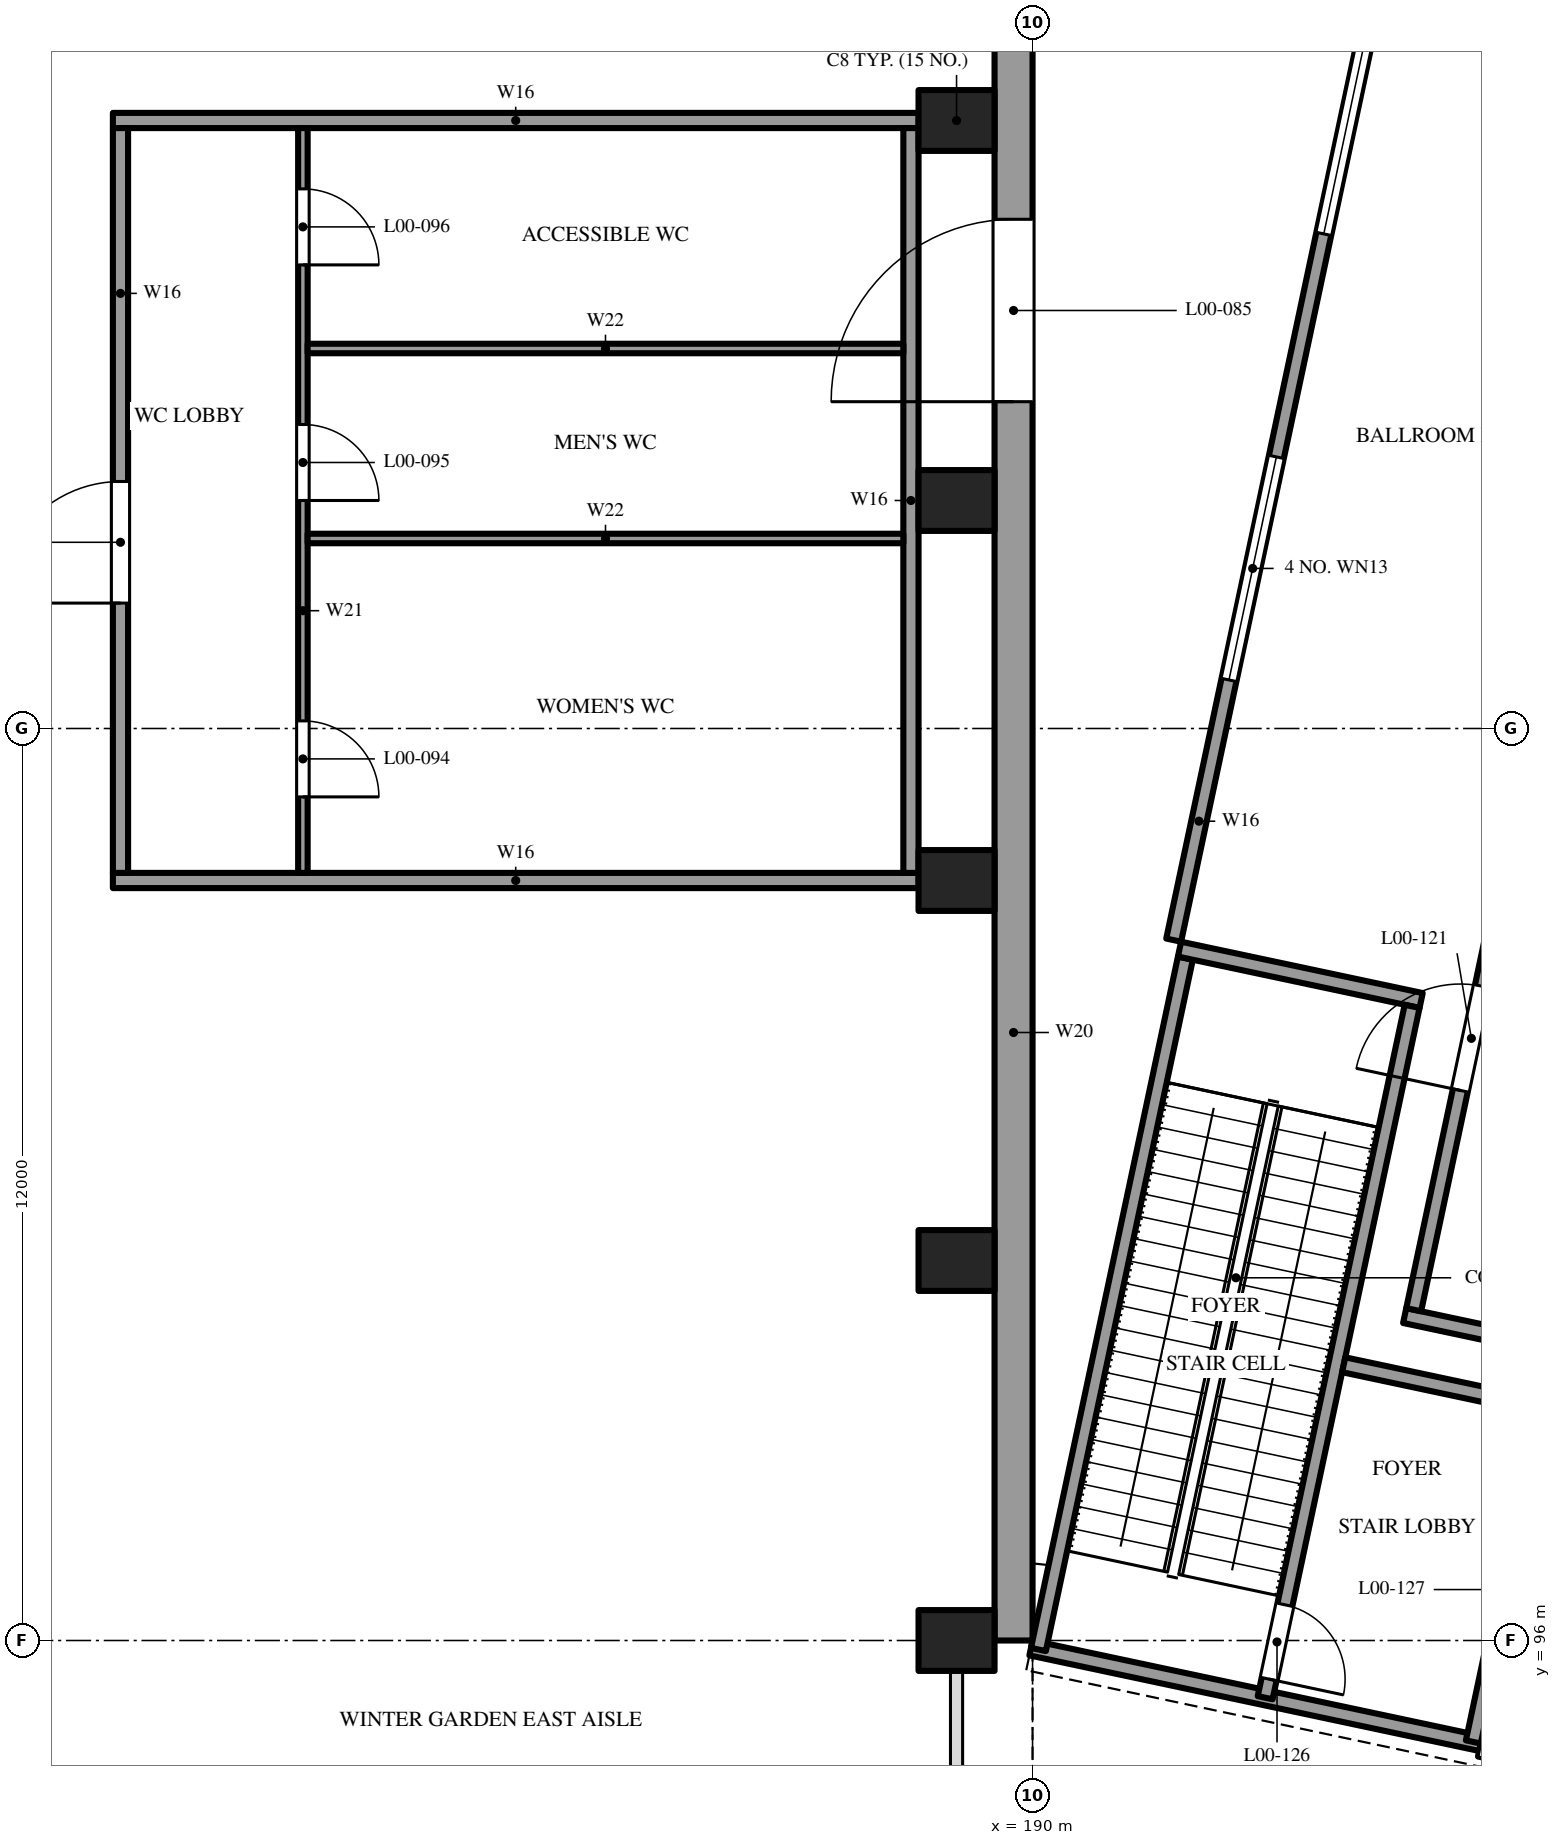
"""IFC4 building model, lengths in metres.
Left out: names, types, materials, properties, quantities, classifications, styles, units other than length and angle.
Written with IfcOpenShell. Run it as: python <this file> out.ifc"""

import sys

from ifc_helpers import new_model, si_unit, direction, frame, frame_2d, origin, origin_2d, place, context, subcontext, project, spatial, rectangle, extrude, element, fill, save


model = new_model("IFC4")
c1 = context("Model", 3, precision=1e-05, world=origin(), true_north=direction((0.0, 1.0)))
c2 = subcontext(c1, "Body", "Model", "MODEL_VIEW")
j1 = project(units=[si_unit("LENGTHUNIT", "METRE"), si_unit("PLANEANGLEUNIT", "RADIAN")], contexts=[c1])
p1 = place(None, origin())
s1 = spatial("IfcSite", under=j1, at=p1, CompositionType="ELEMENT")
p2 = place(p1, origin())
s2 = spatial("IfcBuilding", under=s1, at=p2, CompositionType="ELEMENT")
p3 = place(p2, origin())
s3 = spatial("IfcBuildingStorey", under=s2, at=p3, CompositionType="ELEMENT", Elevation=0.0)
for number, where, z_axis, x_axis in (
    (1, (189.0, 96.0, -0.4), (0.0, 0.0, 1.0), (1.0, 0.0, 0.0)),
    (2, (189.0, 101.0, -0.4), (0.0, 0.0, 1.0), (1.0, 0.0, 0.0)),
    (3, (189.0, 106.0, -0.4), (0.0, 0.0, 1.0), (1.0, 0.0, 0.0)),
    (4, (189.0, 111.0, -0.4), (0.0, 0.0, 1.0), (1.0, 0.0, 0.0)),
    (5, (189.0, 116.0, -0.4), (0.0, 0.0, 1.0), (1.0, 0.0, 0.0)),
):
    element("IfcColumn", number, at=place(p3, frame(where, z_axis=z_axis, x_axis=x_axis)), inside=s3, PredefinedType="COLUMN", context=c2, shape_type="SweptSolid", body=[
        extrude(rectangle(XDim=1.0, YDim=0.8, at=origin_2d()), origin(), (0.0, 0.0, 1.0), 7.6),
    ])
p4 = place(p3, frame((189.75, 96.0, 0.0), z_axis=(0.0, 0.0, 1.0), x_axis=(0.0, 1.0, 0.0)))
e6 = element("IfcWall", 6, at=p4, inside=s3, PredefinedType="SOLIDWALL", context=c2, shape_type="SweptSolid", body=[
    extrude(rectangle(XDim=46.0, YDim=0.5, at=frame_2d((23.0, 0.0))), origin(), (0.0, 0.0, 1.0), 7.2),
])
p5 = place(p4, frame((16.3, 0.0, 0.0)))
e7 = element("IfcOpeningElement", 7, at=p5, cuts=e6, PredefinedType="OPENING", context=c2, shape_type="SweptSolid", body=[
    extrude(rectangle(XDim=2.4, YDim=2.4, at=frame_2d((1.2, 1.2))), frame((0.0, 0.26, 0.0), z_axis=(0.0, -1.0, 0.0), x_axis=(1.0, 0.0, 0.0)), (0.0, 0.0, 1.0), 0.52),
])
p6 = place(p4, frame((26.3, 0.0, 0.0)))
e8 = element("IfcOpeningElement", 8, at=p6, cuts=e6, PredefinedType="OPENING", context=c2, shape_type="SweptSolid", body=[
    extrude(rectangle(XDim=2.4, YDim=2.4, at=frame_2d((1.2, 1.2))), frame((0.0, 0.26, 0.0), z_axis=(0.0, -1.0, 0.0), x_axis=(1.0, 0.0, 0.0)), (0.0, 0.0, 1.0), 0.52),
])
p7 = place(p4, frame((36.3, 0.0, 0.0)))
e9 = element("IfcOpeningElement", 9, at=p7, cuts=e6, PredefinedType="OPENING", context=c2, shape_type="SweptSolid", body=[
    extrude(rectangle(XDim=2.4, YDim=2.4, at=frame_2d((1.2, 1.2))), frame((0.0, 0.26, 0.0), z_axis=(0.0, -1.0, 0.0), x_axis=(1.0, 0.0, 0.0)), (0.0, 0.0, 1.0), 0.52),
])
for number, where, z_axis, x_axis in (
    (10, (177.9, 106.0, 0.0), (0.0, 0.0, 1.0), (1.0, 0.0, 0.0)),
    (11, (177.9, 116.0, 0.0), (0.0, 0.0, 1.0), (1.0, 0.0, 0.0)),
):
    element("IfcWall", number, at=place(p3, frame(where, z_axis=z_axis, x_axis=x_axis)), inside=s3, PredefinedType="SOLIDWALL", context=c2, shape_type="SweptSolid", body=[
        extrude(rectangle(XDim=10.6, YDim=0.2, at=frame_2d((5.3, 0.0))), origin(), (0.0, 0.0, 1.0), 4.3),
    ])
p8 = place(p3, frame((178.0, 106.1, 0.0), z_axis=(0.0, 0.0, 1.0), x_axis=(0.0, 1.0, 0.0)))
e12 = element("IfcWall", 12, at=p8, inside=s3, PredefinedType="SOLIDWALL", context=c2, shape_type="SweptSolid", body=[
    extrude(rectangle(XDim=9.8, YDim=0.2, at=frame_2d((4.9, 0.0))), origin(), (0.0, 0.0, 1.0), 4.3),
])
p9 = place(p8, frame((3.55, 0.0, 0.0)))
e13 = element("IfcOpeningElement", 13, at=p9, cuts=e12, PredefinedType="OPENING", context=c2, shape_type="SweptSolid", body=[
    extrude(rectangle(XDim=1.6, YDim=2.1, at=frame_2d((0.8, 1.05))), frame((0.0, 0.11, 0.0), z_axis=(0.0, -1.0, 0.0), x_axis=(1.0, 0.0, 0.0)), (0.0, 0.0, 1.0), 0.22),
])
p10 = place(p3, frame((188.4, 106.1, 0.0), z_axis=(0.0, 0.0, 1.0), x_axis=(0.0, 1.0, 0.0)))
e14 = element("IfcWall", 14, at=p10, inside=s3, PredefinedType="SOLIDWALL", context=c2, shape_type="SweptSolid", body=[
    extrude(rectangle(XDim=9.8, YDim=0.2, at=frame_2d((4.9, 0.0))), origin(), (0.0, 0.0, 1.0), 4.3),
])
p11 = place(p3, frame((180.4, 106.1, 0.0), z_axis=(0.0, 0.0, 1.0), x_axis=(0.0, 1.0, 0.0)))
e15 = element("IfcWall", 15, at=p11, inside=s3, PredefinedType="PARTITIONING", context=c2, shape_type="SweptSolid", body=[
    extrude(rectangle(XDim=9.8, YDim=0.125, at=frame_2d((4.9, 0.0))), origin(), (0.0, 0.0, 1.0), 4.3),
])
p12 = place(p11, frame((1.0, 0.0, 0.0)))
e16 = element("IfcOpeningElement", 16, at=p12, cuts=e15, PredefinedType="OPENING", context=c2, shape_type="SweptSolid", body=[
    extrude(rectangle(XDim=1.0, YDim=2.1, at=frame_2d((0.5, 1.05))), frame((0.0, 0.073, 0.0), z_axis=(0.0, -1.0, 0.0), x_axis=(1.0, 0.0, 0.0)), (0.0, 0.0, 1.0), 0.145),
])
p13 = place(p11, frame((4.9, 0.0, 0.0)))
e17 = element("IfcOpeningElement", 17, at=p13, cuts=e15, PredefinedType="OPENING", context=c2, shape_type="SweptSolid", body=[
    extrude(rectangle(XDim=1.0, YDim=2.1, at=frame_2d((0.5, 1.05))), frame((0.0, 0.073, 0.0), z_axis=(0.0, -1.0, 0.0), x_axis=(1.0, 0.0, 0.0)), (0.0, 0.0, 1.0), 0.145),
])
p14 = place(p11, frame((8.0, 0.0, 0.0)))
e18 = element("IfcOpeningElement", 18, at=p14, cuts=e15, PredefinedType="OPENING", context=c2, shape_type="SweptSolid", body=[
    extrude(rectangle(XDim=1.0, YDim=2.1, at=frame_2d((0.5, 1.05))), frame((0.0, 0.073, 0.0), z_axis=(0.0, -1.0, 0.0), x_axis=(1.0, 0.0, 0.0)), (0.0, 0.0, 1.0), 0.145),
])
for number, where, z_axis, x_axis in (
    (19, (180.462, 110.5, 0.0), (0.0, 0.0, 1.0), (1.0, 0.0, 0.0)),
    (20, (180.462, 113.0, 0.0), (0.0, 0.0, 1.0), (1.0, 0.0, 0.0)),
):
    element("IfcWall", number, at=place(p3, frame(where, z_axis=z_axis, x_axis=x_axis)), inside=s3, PredefinedType="PARTITIONING", context=c2, shape_type="SweptSolid", body=[
        extrude(rectangle(XDim=7.838, YDim=0.125, at=frame_2d((3.919, 0.0))), origin(), (0.0, 0.0, 1.0), 4.3),
    ])
p15 = place(p3, frame((195.876, 94.546, 0.0), z_axis=(0.0, 0.0, 1.0), x_axis=(0.978150285663, -0.207899058817, 0.0)))
e21 = element("IfcWall", 21, at=p15, inside=s3, PredefinedType="SOLIDWALL", context=c2, shape_type="SweptSolid", body=[
    extrude(rectangle(XDim=3.55, YDim=0.15, at=frame_2d((1.775, 0.0))), origin(), (0.0, 0.0, 1.0), 4.5),
])
p16 = place(p15, frame((0.5, 0.0, 0.0)))
e22 = element("IfcOpeningElement", 22, at=p16, cuts=e21, PredefinedType="OPENING", context=c2, shape_type="SweptSolid", body=[
    extrude(rectangle(XDim=2.4, YDim=2.4, at=frame_2d((1.2, 1.2))), frame((0.0, 0.085, 0.0), z_axis=(0.0, -1.0, 0.0), x_axis=(1.0, 0.0, 0.0)), (0.0, 0.0, 1.0), 0.17),
])
p17 = place(p3, frame((194.896, 100.275, 0.0), z_axis=(0.0, 0.0, 1.0), x_axis=(0.978148943882, -0.207905371704, 0.0)))
e23 = element("IfcWall", 23, at=p17, inside=s3, PredefinedType="SOLIDWALL", context=c2, shape_type="SweptSolid", body=[
    extrude(rectangle(XDim=5.7, YDim=0.2, at=frame_2d((2.85, 0.0))), origin(), (0.0, 0.0, 1.0), 4.3),
])
p18 = place(p3, frame((195.014, 100.353, 0.0), z_axis=(0.0, 0.0, 1.0), x_axis=(0.207931958438, 0.978143292499, 0.0)))
e24 = element("IfcWall", 24, at=p18, inside=s3, PredefinedType="SOLIDWALL", context=c2, shape_type="SweptSolid", body=[
    extrude(rectangle(XDim=7.1, YDim=0.2, at=frame_2d((3.55, 0.0))), origin(), (0.0, 0.0, 1.0), 4.3),
])
p19 = place(p18, frame((2.95, 0.0, 0.0)))
e25 = element("IfcOpeningElement", 25, at=p19, cuts=e24, PredefinedType="OPENING", context=c2, shape_type="SweptSolid", body=[
    extrude(rectangle(XDim=1.4, YDim=2.1, at=frame_2d((0.7, 1.05))), frame((0.0, 0.11, 0.0), z_axis=(0.0, -1.0, 0.0), x_axis=(1.0, 0.0, 0.0)), (0.0, 0.0, 1.0), 0.22),
])
p20 = place(p3, frame((189.979, 95.902, 0.0), z_axis=(0.0, 0.0, 1.0), x_axis=(0.978148901478, -0.207905571204, 0.0)))
e26 = element("IfcWall", 26, at=p20, inside=s3, PredefinedType="SOLIDWALL", context=c2, shape_type="SweptSolid", body=[
    extrude(rectangle(XDim=6.05, YDim=0.2, at=frame_2d((3.025, 0.0))), origin(), (0.0, 0.0, 1.0), 6.95),
])
p21 = place(p3, frame((190.077, 95.881, 0.0), z_axis=(0.0, 0.0, 1.0), x_axis=(0.207909931549, 0.978147974676, 0.0)))
e27 = element("IfcWall", 27, at=p21, inside=s3, PredefinedType="SOLIDWALL", context=c2, shape_type="SweptSolid", body=[
    extrude(rectangle(XDim=9.3, YDim=0.2, at=frame_2d((4.65, 0.0))), origin(), (0.0, 0.0, 1.0), 6.95),
])
p22 = place(p3, frame((191.934, 105.097, 0.0), z_axis=(0.0, 0.0, 1.0), x_axis=(0.978158278153, -0.207861451167, 0.0)))
e28 = element("IfcWall", 28, at=p22, inside=s3, PredefinedType="SOLIDWALL", context=c2, shape_type="SweptSolid", body=[
    extrude(rectangle(XDim=3.25, YDim=0.2, at=frame_2d((1.625, 0.0))), origin(), (0.0, 0.0, 1.0), 6.95),
])
p23 = place(p3, frame((193.06, 95.247, 0.0), z_axis=(0.0, 0.0, 1.0), x_axis=(0.207915270313, 0.978146839882, 0.0)))
e29 = element("IfcWall", 29, at=p23, inside=s3, PredefinedType="SOLIDWALL", context=c2, shape_type="SweptSolid", body=[
    extrude(rectangle(XDim=9.3, YDim=0.2, at=frame_2d((4.65, 0.0))), origin(), (0.0, 0.0, 1.0), 6.95),
])
p24 = place(p23, frame((0.25, 0.0, 0.0)))
e30 = element("IfcOpeningElement", 30, at=p24, cuts=e29, PredefinedType="OPENING", context=c2, shape_type="SweptSolid", body=[
    extrude(rectangle(XDim=1.0, YDim=2.1, at=frame_2d((0.5, 1.05))), frame((0.0, 0.11, 0.0), z_axis=(0.0, -1.0, 0.0), x_axis=(1.0, 0.0, 0.0)), (0.0, 0.0, 1.0), 0.22),
])
p25 = place(p3, frame((194.094, 99.628, 0.0), z_axis=(0.0, 0.0, 1.0), x_axis=(0.978138015478, -0.207956780791, 0.0)))
e31 = element("IfcWall", 31, at=p25, inside=s3, PredefinedType="SOLIDWALL", context=c2, shape_type="SweptSolid", body=[
    extrude(rectangle(XDim=2.8, YDim=0.2, at=frame_2d((1.4, 0.0))), origin(), (0.0, 0.0, 1.0), 6.95),
])
p26 = place(p3, frame((195.799, 94.665, 0.0), z_axis=(0.0, 0.0, 1.0), x_axis=(0.207956302845, 0.978138117091, 0.0)))
e32 = element("IfcWall", 32, at=p26, inside=s3, PredefinedType="SOLIDWALL", context=c2, shape_type="SweptSolid", body=[
    extrude(rectangle(XDim=4.4, YDim=0.2, at=frame_2d((2.2, 0.0))), origin(), (0.0, 0.0, 1.0), 6.95),
])
p27 = place(p26, frame((1.5, 0.0, 0.0)))
e33 = element("IfcOpeningElement", 33, at=p27, cuts=e32, PredefinedType="OPENING", context=c2, shape_type="SweptSolid", body=[
    extrude(rectangle(XDim=1.1, YDim=2.1, at=frame_2d((0.55, 1.05))), frame((0.0, 0.11, 0.0), z_axis=(0.0, -1.0, 0.0), x_axis=(1.0, 0.0, 0.0)), (0.0, 0.0, 1.0), 0.22),
])
p28 = place(p3, frame((191.856, 105.215, -0.3), z_axis=(0.0, 0.0, 1.0), x_axis=(0.207914134202, 0.978147081373, 0.0)))
e34 = element("IfcWall", 34, at=p28, inside=s3, PredefinedType="SOLIDWALL", context=c2, shape_type="SweptSolid", body=[
    extrude(rectangle(XDim=36.75, YDim=0.2, at=frame_2d((18.375, 0.0))), origin(), (0.0, 0.0, 1.0), 7.5),
])
p29 = place(p28, frame((3.5, 0.0, 1.0)))
e35 = element("IfcOpeningElement", 35, at=p29, cuts=e34, PredefinedType="OPENING", context=c2, shape_type="SweptSolid", body=[
    extrude(rectangle(XDim=3.0, YDim=2.4, at=frame_2d((1.5, 1.2))), frame((0.0, 0.11, 0.0), z_axis=(0.0, -1.0, 0.0), x_axis=(1.0, 0.0, 0.0)), (0.0, 0.0, 1.0), 0.22),
])
p30 = place(p28, frame((9.5, 0.0, 1.0)))
e36 = element("IfcOpeningElement", 36, at=p30, cuts=e34, PredefinedType="OPENING", context=c2, shape_type="SweptSolid", body=[
    extrude(rectangle(XDim=3.0, YDim=2.4, at=frame_2d((1.5, 1.2))), frame((0.0, 0.11, 0.0), z_axis=(0.0, -1.0, 0.0), x_axis=(1.0, 0.0, 0.0)), (0.0, 0.0, 1.0), 0.22),
])
p31 = place(p28, frame((15.5, 0.0, 1.0)))
e37 = element("IfcOpeningElement", 37, at=p31, cuts=e34, PredefinedType="OPENING", context=c2, shape_type="SweptSolid", body=[
    extrude(rectangle(XDim=3.0, YDim=2.4, at=frame_2d((1.5, 1.2))), frame((0.0, 0.11, 0.0), z_axis=(0.0, -1.0, 0.0), x_axis=(1.0, 0.0, 0.0)), (0.0, 0.0, 1.0), 0.22),
])
p32 = place(p28, frame((21.5, 0.0, 1.0)))
e38 = element("IfcOpeningElement", 38, at=p32, cuts=e34, PredefinedType="OPENING", context=c2, shape_type="SweptSolid", body=[
    extrude(rectangle(XDim=3.0, YDim=2.4, at=frame_2d((1.5, 1.2))), frame((0.0, 0.11, 0.0), z_axis=(0.0, -1.0, 0.0), x_axis=(1.0, 0.0, 0.0)), (0.0, 0.0, 1.0), 0.22),
])
p33 = place(p28, frame((27.5, 0.0, 1.0)))
e39 = element("IfcOpeningElement", 39, at=p33, cuts=e34, PredefinedType="OPENING", context=c2, shape_type="SweptSolid", body=[
    extrude(rectangle(XDim=3.0, YDim=2.4, at=frame_2d((1.5, 1.2))), frame((0.0, 0.11, 0.0), z_axis=(0.0, -1.0, 0.0), x_axis=(1.0, 0.0, 0.0)), (0.0, 0.0, 1.0), 0.22),
])
p34 = place(p5, origin())
e40 = element("IfcDoor", 40, at=p34, inside=s3, OperationType="DOUBLE_DOOR_SINGLE_SWING", PredefinedType="DOOR", context=c2, shape_type="SweptSolid", body=[
    extrude(rectangle(XDim=2.4, YDim=2.4, at=frame_2d((1.2, 1.2))), frame((0.0, 0.025, 0.0), z_axis=(0.0, -1.0, 0.0), x_axis=(1.0, 0.0, 0.0)), (0.0, 0.0, 1.0), 0.05),
])
fill(e7, e40)
p35 = place(p9, origin())
e41 = element("IfcDoor", 41, at=p35, inside=s3, OperationType="DOUBLE_DOOR_SINGLE_SWING", PredefinedType="DOOR", context=c2, shape_type="SweptSolid", body=[
    extrude(rectangle(XDim=1.6, YDim=2.1, at=frame_2d((0.8, 1.05))), frame((0.0, 0.025, 0.0), z_axis=(0.0, -1.0, 0.0), x_axis=(1.0, 0.0, 0.0)), (0.0, 0.0, 1.0), 0.05),
])
fill(e13, e41)
p36 = place(p12, frame((1.0, 0.0, 0.0), z_axis=(0.0, 0.0, 1.0), x_axis=(-1.0, 0.0, 0.0)))
e42 = element("IfcDoor", 42, at=p36, inside=s3, OperationType="SINGLE_SWING_RIGHT", PredefinedType="DOOR", context=c2, shape_type="SweptSolid", body=[
    extrude(rectangle(XDim=1.0, YDim=2.1, at=frame_2d((0.5, 1.05))), frame((0.0, 0.025, 0.0), z_axis=(0.0, -1.0, 0.0), x_axis=(1.0, 0.0, 0.0)), (0.0, 0.0, 1.0), 0.05),
])
fill(e16, e42)
p37 = place(p13, frame((1.0, 0.0, 0.0), z_axis=(0.0, 0.0, 1.0), x_axis=(-1.0, 0.0, 0.0)))
e43 = element("IfcDoor", 43, at=p37, inside=s3, OperationType="SINGLE_SWING_RIGHT", PredefinedType="DOOR", context=c2, shape_type="SweptSolid", body=[
    extrude(rectangle(XDim=1.0, YDim=2.1, at=frame_2d((0.5, 1.05))), frame((0.0, 0.025, 0.0), z_axis=(0.0, -1.0, 0.0), x_axis=(1.0, 0.0, 0.0)), (0.0, 0.0, 1.0), 0.05),
])
fill(e17, e43)
p38 = place(p14, frame((1.0, 0.0, 0.0), z_axis=(0.0, 0.0, 1.0), x_axis=(-1.0, 0.0, 0.0)))
e44 = element("IfcDoor", 44, at=p38, inside=s3, OperationType="SINGLE_SWING_LEFT", PredefinedType="DOOR", context=c2, shape_type="SweptSolid", body=[
    extrude(rectangle(XDim=1.0, YDim=2.1, at=frame_2d((0.5, 1.05))), frame((0.0, 0.025, 0.0), z_axis=(0.0, -1.0, 0.0), x_axis=(1.0, 0.0, 0.0)), (0.0, 0.0, 1.0), 0.05),
])
fill(e18, e44)
p39 = place(p19, origin())
e45 = element("IfcDoor", 45, at=p39, inside=s3, OperationType="DOUBLE_DOOR_SINGLE_SWING", PredefinedType="DOOR", context=c2, shape_type="SweptSolid", body=[
    extrude(rectangle(XDim=1.4, YDim=2.1, at=frame_2d((0.7, 1.05))), frame((0.0, 0.025, 0.0), z_axis=(0.0, -1.0, 0.0), x_axis=(1.0, 0.0, 0.0)), (0.0, 0.0, 1.0), 0.05),
])
fill(e25, e45)
p40 = place(p24, frame((1.0, 0.0, 0.0), z_axis=(0.0, 0.0, 1.0), x_axis=(-1.0, 0.0, 0.0)))
e46 = element("IfcDoor", 46, at=p40, inside=s3, OperationType="SINGLE_SWING_RIGHT", PredefinedType="DOOR", context=c2, shape_type="SweptSolid", body=[
    extrude(rectangle(XDim=1.0, YDim=2.1, at=frame_2d((0.5, 1.05))), frame((0.0, 0.025, 0.0), z_axis=(0.0, -1.0, 0.0), x_axis=(1.0, 0.0, 0.0)), (0.0, 0.0, 1.0), 0.05),
])
fill(e30, e46)
p41 = place(p29, origin())
e47 = element("IfcWindow", 47, at=p41, inside=s3, PartitioningType="SINGLE_PANEL", PredefinedType="WINDOW", context=c2, shape_type="SweptSolid", body=[
    extrude(rectangle(XDim=3.0, YDim=2.4, at=frame_2d((1.5, 1.2))), frame((0.0, 0.03, 0.0), z_axis=(0.0, -1.0, 0.0), x_axis=(1.0, 0.0, 0.0)), (0.0, 0.0, 1.0), 0.06),
])
fill(e35, e47)
p42 = place(p30, origin())
e48 = element("IfcWindow", 48, at=p42, inside=s3, PartitioningType="SINGLE_PANEL", PredefinedType="WINDOW", context=c2, shape_type="SweptSolid", body=[
    extrude(rectangle(XDim=3.0, YDim=2.4, at=frame_2d((1.5, 1.2))), frame((0.0, 0.03, 0.0), z_axis=(0.0, -1.0, 0.0), x_axis=(1.0, 0.0, 0.0)), (0.0, 0.0, 1.0), 0.06),
])
fill(e36, e48)
save(model, sys.argv[1])
